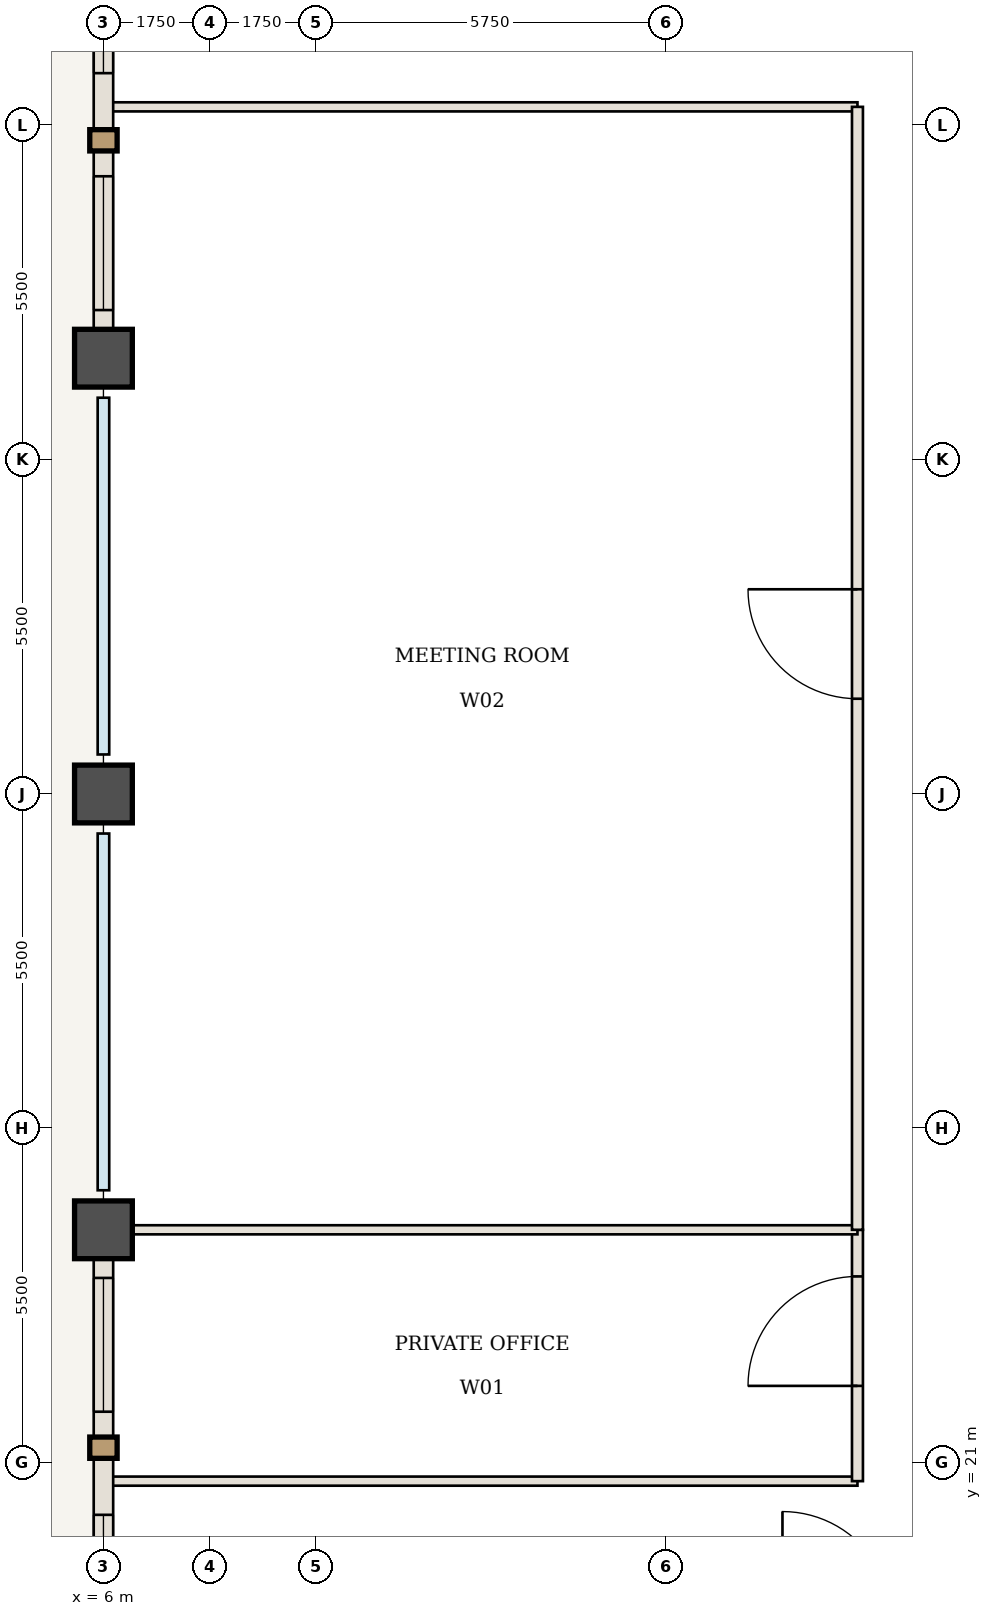
"""IFC4 building model, lengths in metres.
Left out: names, types, materials, properties, quantities, classifications, styles, units other than length and angle.
Written with IfcOpenShell. Run it as: python <this file> out.ifc"""

import sys

from ifc_helpers import new_model, si_unit, direction, frame, frame_2d, origin, origin_2d, place, context, subcontext, project, spatial, rectangle, extrude, element, fill, save


model = new_model("IFC4")
c1 = context("Model", 3, precision=1e-05, world=origin(), true_north=direction((0.0, 1.0)))
c2 = subcontext(c1, "Body", "Model", "MODEL_VIEW")
j1 = project(units=[si_unit("LENGTHUNIT", "METRE"), si_unit("PLANEANGLEUNIT", "RADIAN")], contexts=[c1])
p1 = place(None, origin())
s1 = spatial("IfcSite", under=j1, at=p1, CompositionType="ELEMENT")
p2 = place(p1, origin())
s2 = spatial("IfcBuilding", under=s1, at=p2, CompositionType="ELEMENT")
p3 = place(p2, frame((0.0, 0.0, 106.05)))
s3 = spatial("IfcBuildingStorey", under=s2, at=p3, CompositionType="ELEMENT", Elevation=106.05)
for number, where, z_axis, x_axis in (
    (1, (6.0, 24.833, -0.42), (0.0, 0.0, 1.0), (1.0, 0.0, 0.0)),
    (2, (6.0, 32.0, -0.42), (0.0, 0.0, 1.0), (1.0, 0.0, 0.0)),
    (3, (6.0, 39.167, -0.42), (0.0, 0.0, 1.0), (1.0, 0.0, 0.0)),
):
    element("IfcColumn", number, at=place(p3, frame(where, z_axis=z_axis, x_axis=x_axis)), inside=s3, PredefinedType="COLUMN", context=c2, shape_type="SweptSolid", body=[
        extrude(rectangle(XDim=0.95, YDim=0.95, at=origin_2d()), origin(), (0.0, 0.0, 1.0), 4.97),
    ])
for number, where, z_axis, x_axis in (
    (4, (6.06, 20.7, 0.0), (0.0, 0.0, 1.0), (1.0, 0.0, 0.0)),
    (5, (6.06, 43.3, 0.0), (0.0, 0.0, 1.0), (1.0, 0.0, 0.0)),
):
    element("IfcWall", number, at=place(p3, frame(where, z_axis=z_axis, x_axis=x_axis)), inside=s3, PredefinedType="STANDARD", context=c2, shape_type="SweptSolid", body=[
        extrude(rectangle(XDim=12.34, YDim=0.15, at=frame_2d((6.17, 0.0))), origin(), (0.0, 0.0, 1.0), 3.501),
    ])
p4 = place(p3, frame((18.4, 20.7, 0.0), z_axis=(0.0, 0.0, 1.0), x_axis=(0.0, 1.0, 0.0)))
e6 = element("IfcWall", 6, at=p4, inside=s3, PredefinedType="STANDARD", context=c2, shape_type="SweptSolid", body=[
    extrude(rectangle(XDim=4.133, YDim=0.18, at=frame_2d((2.067, 0.0))), origin(), (0.0, 0.0, 1.0), 4.13),
])
p5 = place(p4, frame((1.567, 0.0, 0.0)))
e7 = element("IfcOpeningElement", 7, at=p5, cuts=e6, PredefinedType="OPENING", context=c2, shape_type="SweptSolid", body=[
    extrude(rectangle(XDim=1.8, YDim=2.35, at=frame_2d((0.9, 1.175))), frame((0.0, 0.1, 0.0), z_axis=(0.0, -1.0, 0.0), x_axis=(1.0, 0.0, 0.0)), (0.0, 0.0, 1.0), 0.2),
])
p6 = place(p3, frame((6.06, 24.833, 0.0), z_axis=(0.0, 0.0, 1.0), x_axis=(1.0, 0.0, 0.0)))
e8 = element("IfcWall", 8, at=p6, inside=s3, PredefinedType="STANDARD", context=c2, shape_type="SweptSolid", body=[
    extrude(rectangle(XDim=12.34, YDim=0.15, at=frame_2d((6.17, 0.0))), origin(), (0.0, 0.0, 1.0), 4.13),
])
p7 = place(p3, frame((18.4, 24.833, 0.0), z_axis=(0.0, 0.0, 1.0), x_axis=(0.0, 1.0, 0.0)))
e9 = element("IfcWall", 9, at=p7, inside=s3, PredefinedType="STANDARD", context=c2, shape_type="SweptSolid", body=[
    extrude(rectangle(XDim=18.467, YDim=0.18, at=frame_2d((9.233, 0.0))), origin(), (0.0, 0.0, 1.0), 4.13),
])
p8 = place(p7, frame((8.733, 0.0, 0.0)))
e10 = element("IfcOpeningElement", 10, at=p8, cuts=e9, PredefinedType="OPENING", context=c2, shape_type="SweptSolid", body=[
    extrude(rectangle(XDim=1.8, YDim=2.35, at=frame_2d((0.9, 1.175))), frame((0.0, 0.1, 0.0), z_axis=(0.0, -1.0, 0.0), x_axis=(1.0, 0.0, 0.0)), (0.0, 0.0, 1.0), 0.2),
])
p9 = place(p3, frame((6.0, 17.667, 0.0), z_axis=(0.0, 0.0, 1.0), x_axis=(0.0, 1.0, 0.0)))
e11 = element("IfcWall", 11, at=p9, inside=s3, PredefinedType="USERDEFINED", context=c2, shape_type="SweptSolid", body=[
    extrude(rectangle(XDim=7.167, YDim=0.32, at=frame_2d((3.583, 0.0))), origin(), (0.0, 0.0, 1.0), 3.33),
])
p10 = place(p9, frame((0.879, 0.0, 0.85)))
e12 = element("IfcOpeningElement", 12, at=p10, cuts=e11, PredefinedType="OPENING", context=c2, shape_type="SweptSolid", body=[
    extrude(rectangle(XDim=1.6, YDim=2.15, at=frame_2d((0.8, 1.075))), frame((0.0, 0.17, 0.0), z_axis=(0.0, -1.0, 0.0), x_axis=(1.0, 0.0, 0.0)), (0.0, 0.0, 1.0), 0.34),
])
p11 = place(p9, frame((4.175, 0.0, 0.85)))
e13 = element("IfcOpeningElement", 13, at=p11, cuts=e11, PredefinedType="OPENING", context=c2, shape_type="SweptSolid", body=[
    extrude(rectangle(XDim=2.2, YDim=2.2, at=frame_2d((1.1, 1.1))), frame((0.0, 0.17, 0.0), z_axis=(0.0, -1.0, 0.0), x_axis=(1.0, 0.0, 0.0)), (0.0, 0.0, 1.0), 0.34),
])
p12 = place(p3, frame((6.0, 39.167, 0.0), z_axis=(0.0, 0.0, 1.0), x_axis=(0.0, 1.0, 0.0)))
e14 = element("IfcWall", 14, at=p12, inside=s3, PredefinedType="USERDEFINED", context=c2, shape_type="SweptSolid", body=[
    extrude(rectangle(XDim=7.167, YDim=0.32, at=frame_2d((3.583, 0.0))), origin(), (0.0, 0.0, 1.0), 3.33),
])
p13 = place(p12, frame((0.792, 0.0, 0.85)))
e15 = element("IfcOpeningElement", 15, at=p13, cuts=e14, PredefinedType="OPENING", context=c2, shape_type="SweptSolid", body=[
    extrude(rectangle(XDim=2.2, YDim=2.2, at=frame_2d((1.1, 1.1))), frame((0.0, 0.17, 0.0), z_axis=(0.0, -1.0, 0.0), x_axis=(1.0, 0.0, 0.0)), (0.0, 0.0, 1.0), 0.34),
])
p14 = place(p12, frame((4.688, 0.0, 0.85)))
e16 = element("IfcOpeningElement", 16, at=p14, cuts=e14, PredefinedType="OPENING", context=c2, shape_type="SweptSolid", body=[
    extrude(rectangle(XDim=1.6, YDim=2.15, at=frame_2d((0.8, 1.075))), frame((0.0, 0.17, 0.0), z_axis=(0.0, -1.0, 0.0), x_axis=(1.0, 0.0, 0.0)), (0.0, 0.0, 1.0), 0.34),
])
p15 = place(p5, origin())
e17 = element("IfcDoor", 17, at=p15, inside=s3, OperationType="SINGLE_SWING_LEFT", PredefinedType="DOOR", context=c2, shape_type="SweptSolid", body=[
    extrude(rectangle(XDim=1.8, YDim=2.35, at=frame_2d((0.9, 1.175))), frame((0.0, 0.025, 0.0), z_axis=(0.0, -1.0, 0.0), x_axis=(1.0, 0.0, 0.0)), (0.0, 0.0, 1.0), 0.05),
])
fill(e7, e17)
p16 = place(p8, origin())
e18 = element("IfcDoor", 18, at=p16, inside=s3, OperationType="SINGLE_SWING_RIGHT", PredefinedType="DOOR", context=c2, shape_type="SweptSolid", body=[
    extrude(rectangle(XDim=1.8, YDim=2.35, at=frame_2d((0.9, 1.175))), frame((0.0, 0.025, 0.0), z_axis=(0.0, -1.0, 0.0), x_axis=(1.0, 0.0, 0.0)), (0.0, 0.0, 1.0), 0.05),
])
fill(e10, e18)
p17 = place(p10, origin())
e19 = element("IfcWindow", 19, at=p17, inside=s3, PartitioningType="SINGLE_PANEL", PredefinedType="WINDOW", context=c2, shape_type="SweptSolid", body=[
    extrude(rectangle(XDim=1.6, YDim=2.15, at=frame_2d((0.8, 1.075))), frame((0.0, 0.03, 0.0), z_axis=(0.0, -1.0, 0.0), x_axis=(1.0, 0.0, 0.0)), (0.0, 0.0, 1.0), 0.06),
])
fill(e12, e19)
p18 = place(p11, origin())
e20 = element("IfcWindow", 20, at=p18, inside=s3, PartitioningType="SINGLE_PANEL", PredefinedType="WINDOW", context=c2, shape_type="SweptSolid", body=[
    extrude(rectangle(XDim=2.2, YDim=2.2, at=frame_2d((1.1, 1.1))), frame((0.0, 0.03, 0.0), z_axis=(0.0, -1.0, 0.0), x_axis=(1.0, 0.0, 0.0)), (0.0, 0.0, 1.0), 0.06),
])
fill(e13, e20)
p19 = place(p13, origin())
e21 = element("IfcWindow", 21, at=p19, inside=s3, PartitioningType="SINGLE_PANEL", PredefinedType="WINDOW", context=c2, shape_type="SweptSolid", body=[
    extrude(rectangle(XDim=2.2, YDim=2.2, at=frame_2d((1.1, 1.1))), frame((0.0, 0.03, 0.0), z_axis=(0.0, -1.0, 0.0), x_axis=(1.0, 0.0, 0.0)), (0.0, 0.0, 1.0), 0.06),
])
fill(e15, e21)
p20 = place(p14, origin())
e22 = element("IfcWindow", 22, at=p20, inside=s3, PartitioningType="SINGLE_PANEL", PredefinedType="WINDOW", context=c2, shape_type="SweptSolid", body=[
    extrude(rectangle(XDim=1.6, YDim=2.15, at=frame_2d((0.8, 1.075))), frame((0.0, 0.03, 0.0), z_axis=(0.0, -1.0, 0.0), x_axis=(1.0, 0.0, 0.0)), (0.0, 0.0, 1.0), 0.06),
])
fill(e16, e22)
save(model, sys.argv[1])
